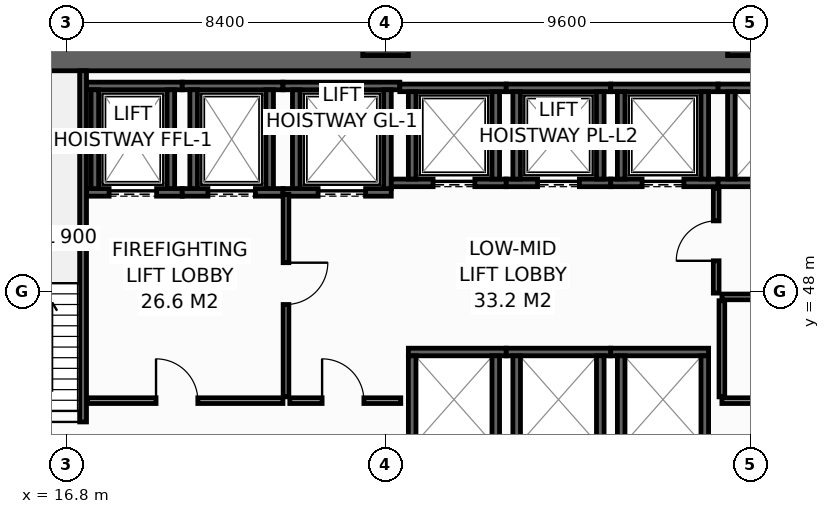
"""IFC4 building model, lengths in metres.
Left out: names, types, materials, properties, quantities, classifications, styles, units other than length and angle.
Written with IfcOpenShell. Run it as: python <this file> out.ifc"""

import sys

from ifc_helpers import new_model, si_unit, direction, frame, frame_2d, origin, origin_2d, place, context, subcontext, project, spatial, rectangle, hollow_rectangle, extrude, element, fill, save


model = new_model("IFC4")
c1 = context("Model", 3, precision=1e-05, world=origin(), true_north=direction((0.0, 1.0)))
c2 = subcontext(c1, "Body", "Model", "MODEL_VIEW")
j1 = project(units=[si_unit("LENGTHUNIT", "METRE"), si_unit("PLANEANGLEUNIT", "RADIAN")], contexts=[c1])
p1 = place(None, origin())
s1 = spatial("IfcSite", under=j1, at=p1, CompositionType="ELEMENT")
p2 = place(p1, origin())
s2 = spatial("IfcBuilding", under=s1, at=p2, CompositionType="ELEMENT")
p3 = place(p2, frame((0.0, 0.0, 92.8)))
s3 = spatial("IfcBuildingStorey", under=s2, at=p3, CompositionType="ELEMENT", Elevation=92.8)
p4 = place(p3, frame((13.5, 54.1, 0.0), z_axis=(0.0, 0.0, 1.0), x_axis=(1.0, 0.0, 0.0)))
e1 = element("IfcWall", 1, at=p4, inside=s3, PredefinedType="SHEAR", context=c2, shape_type="SweptSolid", body=[
    extrude(rectangle(XDim=32.9, YDim=0.6, at=frame_2d((16.45, 0.0))), origin(), (0.0, 0.0, 1.0), 4.15),
])
for number, where, z_axis, x_axis in (
    (2, (25.2, 54.8, 0.0), (0.0, 0.0, 1.0), (1.0, 0.0, 0.0)),
    (3, (34.8, 54.8, 0.0), (0.0, 0.0, 1.0), (1.0, 0.0, 0.0)),
):
    element("IfcColumn", number, at=place(p3, frame(where, z_axis=z_axis, x_axis=x_axis)), inside=s3, PredefinedType="COLUMN", context=c2, shape_type="SweptSolid", body=[
        extrude(hollow_rectangle(XDim=1.2, YDim=1.2, WallThickness=0.055, at=origin_2d()), origin(), (0.0, 0.0, 1.0), 4.4),
    ])
p5 = place(p3, frame((17.33, 50.6, 0.0), z_axis=(0.0, 0.0, 1.0), x_axis=(1.0, 0.0, 0.0)))
e4 = element("IfcWall", 4, at=p5, inside=s3, PredefinedType="SHEAR", context=c2, shape_type="SweptSolid", body=[
    extrude(rectangle(XDim=2.52, YDim=0.2, at=frame_2d((1.26, 0.0))), origin(), (0.0, 0.0, 1.0), 4.15),
])
p6 = place(p5, frame((0.595, 0.0, 0.0)))
e5 = element("IfcOpeningElement", 5, at=p6, cuts=e4, PredefinedType="OPENING", context=c2, shape_type="SweptSolid", body=[
    extrude(rectangle(XDim=1.25, YDim=2.3, at=frame_2d((0.625, 1.15))), frame((0.0, 0.11, 0.0), z_axis=(0.0, -1.0, 0.0), x_axis=(1.0, 0.0, 0.0)), (0.0, 0.0, 1.0), 0.22),
])
p7 = place(p3, frame((17.33, 53.4, 0.0), z_axis=(0.0, 0.0, 1.0), x_axis=(1.0, 0.0, 0.0)))
e6 = element("IfcWall", 6, at=p7, inside=s3, PredefinedType="SHEAR", context=c2, shape_type="SweptSolid", body=[
    extrude(rectangle(XDim=2.52, YDim=0.2, at=frame_2d((1.26, 0.0))), origin(), (0.0, 0.0, 1.0), 4.15),
])
for number, where, z_axis, x_axis in (
    (7, (17.55, 50.7, 0.0), (0.0, 0.0, 1.0), (0.0, 1.0, 0.0)),
    (8, (19.55, 50.7, 0.0), (0.0, 0.0, 1.0), (0.0, 1.0, 0.0)),
):
    element("IfcWall", number, at=place(p3, frame(where, z_axis=z_axis, x_axis=x_axis)), inside=s3, PredefinedType="SHEAR", context=c2, shape_type="SweptSolid", body=[
        extrude(rectangle(XDim=2.6, YDim=0.2, at=frame_2d((1.3, 0.0))), origin(), (0.0, 0.0, 1.0), 4.15),
    ])
p8 = place(p3, frame((19.85, 50.6, 0.0), z_axis=(0.0, 0.0, 1.0), x_axis=(1.0, 0.0, 0.0)))
e9 = element("IfcWall", 9, at=p8, inside=s3, PredefinedType="SHEAR", context=c2, shape_type="SweptSolid", body=[
    extrude(rectangle(XDim=2.65, YDim=0.2, at=frame_2d((1.325, 0.0))), origin(), (0.0, 0.0, 1.0), 4.15),
])
p9 = place(p8, frame((0.675, 0.0, 0.0)))
e10 = element("IfcOpeningElement", 10, at=p9, cuts=e9, PredefinedType="OPENING", context=c2, shape_type="SweptSolid", body=[
    extrude(rectangle(XDim=1.25, YDim=2.3, at=frame_2d((0.625, 1.15))), frame((0.0, 0.11, 0.0), z_axis=(0.0, -1.0, 0.0), x_axis=(1.0, 0.0, 0.0)), (0.0, 0.0, 1.0), 0.22),
])
p10 = place(p3, frame((19.85, 53.4, 0.0), z_axis=(0.0, 0.0, 1.0), x_axis=(1.0, 0.0, 0.0)))
e11 = element("IfcWall", 11, at=p10, inside=s3, PredefinedType="SHEAR", context=c2, shape_type="SweptSolid", body=[
    extrude(rectangle(XDim=2.65, YDim=0.2, at=frame_2d((1.325, 0.0))), origin(), (0.0, 0.0, 1.0), 4.15),
])
for number, where, z_axis, x_axis in (
    (12, (20.15, 50.7, 0.0), (0.0, 0.0, 1.0), (0.0, 1.0, 0.0)),
    (13, (22.15, 50.7, 0.0), (0.0, 0.0, 1.0), (0.0, 1.0, 0.0)),
):
    element("IfcWall", number, at=place(p3, frame(where, z_axis=z_axis, x_axis=x_axis)), inside=s3, PredefinedType="SHEAR", context=c2, shape_type="SweptSolid", body=[
        extrude(rectangle(XDim=2.6, YDim=0.2, at=frame_2d((1.3, 0.0))), origin(), (0.0, 0.0, 1.0), 4.15),
    ])
p11 = place(p3, frame((22.5, 50.6, 0.0), z_axis=(0.0, 0.0, 1.0), x_axis=(1.0, 0.0, 0.0)))
e14 = element("IfcWall", 14, at=p11, inside=s3, PredefinedType="SHEAR", context=c2, shape_type="SweptSolid", body=[
    extrude(rectangle(XDim=2.85, YDim=0.2, at=frame_2d((1.425, 0.0))), origin(), (0.0, 0.0, 1.0), 4.15),
])
p12 = place(p11, frame((0.925, 0.0, 0.0)))
e15 = element("IfcOpeningElement", 15, at=p12, cuts=e14, PredefinedType="OPENING", context=c2, shape_type="SweptSolid", body=[
    extrude(rectangle(XDim=1.25, YDim=2.3, at=frame_2d((0.625, 1.15))), frame((0.0, 0.11, 0.0), z_axis=(0.0, -1.0, 0.0), x_axis=(1.0, 0.0, 0.0)), (0.0, 0.0, 1.0), 0.22),
])
p13 = place(p3, frame((22.5, 53.4, 0.0), z_axis=(0.0, 0.0, 1.0), x_axis=(1.0, 0.0, 0.0)))
e16 = element("IfcWall", 16, at=p13, inside=s3, PredefinedType="SHEAR", context=c2, shape_type="SweptSolid", body=[
    extrude(rectangle(XDim=3.075, YDim=0.2, at=frame_2d((1.538, 0.0))), origin(), (0.0, 0.0, 1.0), 4.15),
])
for number, where, z_axis, x_axis in (
    (17, (22.85, 50.7, 0.0), (0.0, 0.0, 1.0), (0.0, 1.0, 0.0)),
    (18, (25.25, 50.7, 0.0), (0.0, 0.0, 1.0), (0.0, 1.0, 0.0)),
):
    element("IfcWall", number, at=place(p3, frame(where, z_axis=z_axis, x_axis=x_axis)), inside=s3, PredefinedType="SHEAR", context=c2, shape_type="SweptSolid", body=[
        extrude(rectangle(XDim=2.6, YDim=0.2, at=frame_2d((1.3, 0.0))), origin(), (0.0, 0.0, 1.0), 4.15),
    ])
p14 = place(p3, frame((25.35, 50.85, 0.0), z_axis=(0.0, 0.0, 1.0), x_axis=(1.0, 0.0, 0.0)))
e19 = element("IfcWall", 19, at=p14, inside=s3, PredefinedType="SHEAR", context=c2, shape_type="SweptSolid", body=[
    extrude(rectangle(XDim=3.025, YDim=0.2, at=frame_2d((1.512, 0.0))), origin(), (0.0, 0.0, 1.0), 4.15),
])
p15 = place(p14, frame((1.1, 0.0, 0.0)))
e20 = element("IfcOpeningElement", 20, at=p15, cuts=e19, PredefinedType="OPENING", context=c2, shape_type="SweptSolid", body=[
    extrude(rectangle(XDim=1.1, YDim=2.2, at=frame_2d((0.55, 1.1))), frame((0.0, 0.11, 0.0), z_axis=(0.0, -1.0, 0.0), x_axis=(1.0, 0.0, 0.0)), (0.0, 0.0, 1.0), 0.22),
])
p16 = place(p3, frame((25.575, 53.35, 0.0), z_axis=(0.0, 0.0, 1.0), x_axis=(1.0, 0.0, 0.0)))
e21 = element("IfcWall", 21, at=p16, inside=s3, PredefinedType="SHEAR", context=c2, shape_type="SweptSolid", body=[
    extrude(rectangle(XDim=2.8, YDim=0.2, at=frame_2d((1.4, 0.0))), origin(), (0.0, 0.0, 1.0), 4.15),
])
for number, where, z_axis, x_axis in (
    (22, (25.9, 50.95, 0.0), (0.0, 0.0, 1.0), (0.0, 1.0, 0.0)),
    (23, (28.1, 50.95, 0.0), (0.0, 0.0, 1.0), (0.0, 1.0, 0.0)),
):
    element("IfcWall", number, at=place(p3, frame(where, z_axis=z_axis, x_axis=x_axis)), inside=s3, PredefinedType="SHEAR", context=c2, shape_type="SweptSolid", body=[
        extrude(rectangle(XDim=2.3, YDim=0.2, at=frame_2d((1.15, 0.0))), origin(), (0.0, 0.0, 1.0), 4.15),
    ])
p17 = place(p3, frame((28.375, 50.85, 0.0), z_axis=(0.0, 0.0, 1.0), x_axis=(1.0, 0.0, 0.0)))
e24 = element("IfcWall", 24, at=p17, inside=s3, PredefinedType="SHEAR", context=c2, shape_type="SweptSolid", body=[
    extrude(rectangle(XDim=2.75, YDim=0.2, at=frame_2d((1.375, 0.0))), origin(), (0.0, 0.0, 1.0), 4.15),
])
p18 = place(p17, frame((0.825, 0.0, 0.0)))
e25 = element("IfcOpeningElement", 25, at=p18, cuts=e24, PredefinedType="OPENING", context=c2, shape_type="SweptSolid", body=[
    extrude(rectangle(XDim=1.1, YDim=2.2, at=frame_2d((0.55, 1.1))), frame((0.0, 0.11, 0.0), z_axis=(0.0, -1.0, 0.0), x_axis=(1.0, 0.0, 0.0)), (0.0, 0.0, 1.0), 0.22),
])
p19 = place(p3, frame((28.375, 53.35, 0.0), z_axis=(0.0, 0.0, 1.0), x_axis=(1.0, 0.0, 0.0)))
e26 = element("IfcWall", 26, at=p19, inside=s3, PredefinedType="SHEAR", context=c2, shape_type="SweptSolid", body=[
    extrude(rectangle(XDim=2.75, YDim=0.2, at=frame_2d((1.375, 0.0))), origin(), (0.0, 0.0, 1.0), 4.15),
])
for number, where, z_axis, x_axis in (
    (27, (28.65, 50.95, 0.0), (0.0, 0.0, 1.0), (0.0, 1.0, 0.0)),
    (28, (30.85, 50.95, 0.0), (0.0, 0.0, 1.0), (0.0, 1.0, 0.0)),
):
    element("IfcWall", number, at=place(p3, frame(where, z_axis=z_axis, x_axis=x_axis)), inside=s3, PredefinedType="SHEAR", context=c2, shape_type="SweptSolid", body=[
        extrude(rectangle(XDim=2.3, YDim=0.2, at=frame_2d((1.15, 0.0))), origin(), (0.0, 0.0, 1.0), 4.15),
    ])
p20 = place(p3, frame((31.125, 50.85, 0.0), z_axis=(0.0, 0.0, 1.0), x_axis=(1.0, 0.0, 0.0)))
e29 = element("IfcWall", 29, at=p20, inside=s3, PredefinedType="SHEAR", context=c2, shape_type="SweptSolid", body=[
    extrude(rectangle(XDim=2.825, YDim=0.2, at=frame_2d((1.413, 0.0))), origin(), (0.0, 0.0, 1.0), 4.15),
])
p21 = place(p20, frame((0.825, 0.0, 0.0)))
e30 = element("IfcOpeningElement", 30, at=p21, cuts=e29, PredefinedType="OPENING", context=c2, shape_type="SweptSolid", body=[
    extrude(rectangle(XDim=1.1, YDim=2.2, at=frame_2d((0.55, 1.1))), frame((0.0, 0.11, 0.0), z_axis=(0.0, -1.0, 0.0), x_axis=(1.0, 0.0, 0.0)), (0.0, 0.0, 1.0), 0.22),
])
p22 = place(p3, frame((31.125, 53.35, 0.0), z_axis=(0.0, 0.0, 1.0), x_axis=(1.0, 0.0, 0.0)))
e31 = element("IfcWall", 31, at=p22, inside=s3, PredefinedType="SHEAR", context=c2, shape_type="SweptSolid", body=[
    extrude(rectangle(XDim=2.825, YDim=0.2, at=frame_2d((1.413, 0.0))), origin(), (0.0, 0.0, 1.0), 4.15),
])
for number, where, z_axis, x_axis in (
    (32, (31.4, 50.95, 0.0), (0.0, 0.0, 1.0), (0.0, 1.0, 0.0)),
    (33, (33.6, 50.95, 0.0), (0.0, 0.0, 1.0), (0.0, 1.0, 0.0)),
):
    element("IfcWall", number, at=place(p3, frame(where, z_axis=z_axis, x_axis=x_axis)), inside=s3, PredefinedType="SHEAR", context=c2, shape_type="SweptSolid", body=[
        extrude(rectangle(XDim=2.3, YDim=0.2, at=frame_2d((1.15, 0.0))), origin(), (0.0, 0.0, 1.0), 4.15),
    ])
p23 = place(p3, frame((25.8, 46.4, 0.0), z_axis=(0.0, 0.0, 1.0), x_axis=(1.0, 0.0, 0.0)))
e34 = element("IfcWall", 34, at=p23, inside=s3, PredefinedType="SHEAR", context=c2, shape_type="SweptSolid", body=[
    extrude(rectangle(XDim=2.575, YDim=0.2, at=frame_2d((1.288, 0.0))), origin(), (0.0, 0.0, 1.0), 4.15),
])
for number, where, z_axis, x_axis in (
    (35, (25.9, 44.0, 0.0), (0.0, 0.0, 1.0), (0.0, 1.0, 0.0)),
    (36, (28.1, 44.0, 0.0), (0.0, 0.0, 1.0), (0.0, 1.0, 0.0)),
):
    element("IfcWall", number, at=place(p3, frame(where, z_axis=z_axis, x_axis=x_axis)), inside=s3, PredefinedType="SHEAR", context=c2, shape_type="SweptSolid", body=[
        extrude(rectangle(XDim=2.3, YDim=0.2, at=frame_2d((1.15, 0.0))), origin(), (0.0, 0.0, 1.0), 4.15),
    ])
p24 = place(p3, frame((28.375, 46.4, 0.0), z_axis=(0.0, 0.0, 1.0), x_axis=(1.0, 0.0, 0.0)))
e37 = element("IfcWall", 37, at=p24, inside=s3, PredefinedType="SHEAR", context=c2, shape_type="SweptSolid", body=[
    extrude(rectangle(XDim=2.75, YDim=0.2, at=frame_2d((1.375, 0.0))), origin(), (0.0, 0.0, 1.0), 4.15),
])
for number, where, z_axis, x_axis in (
    (38, (28.65, 44.0, 0.0), (0.0, 0.0, 1.0), (0.0, 1.0, 0.0)),
    (39, (30.85, 44.0, 0.0), (0.0, 0.0, 1.0), (0.0, 1.0, 0.0)),
):
    element("IfcWall", number, at=place(p3, frame(where, z_axis=z_axis, x_axis=x_axis)), inside=s3, PredefinedType="SHEAR", context=c2, shape_type="SweptSolid", body=[
        extrude(rectangle(XDim=2.3, YDim=0.2, at=frame_2d((1.15, 0.0))), origin(), (0.0, 0.0, 1.0), 4.15),
    ])
p25 = place(p3, frame((31.125, 46.4, 0.0), z_axis=(0.0, 0.0, 1.0), x_axis=(1.0, 0.0, 0.0)))
e40 = element("IfcWall", 40, at=p25, inside=s3, PredefinedType="SHEAR", context=c2, shape_type="SweptSolid", body=[
    extrude(rectangle(XDim=2.575, YDim=0.2, at=frame_2d((1.288, 0.0))), origin(), (0.0, 0.0, 1.0), 4.15),
])
for number, where, z_axis, x_axis in (
    (41, (31.4, 44.0, 0.0), (0.0, 0.0, 1.0), (0.0, 1.0, 0.0)),
    (42, (33.6, 44.0, 0.0), (0.0, 0.0, 1.0), (0.0, 1.0, 0.0)),
):
    element("IfcWall", number, at=place(p3, frame(where, z_axis=z_axis, x_axis=x_axis)), inside=s3, PredefinedType="SHEAR", context=c2, shape_type="SweptSolid", body=[
        extrude(rectangle(XDim=2.3, YDim=0.2, at=frame_2d((1.15, 0.0))), origin(), (0.0, 0.0, 1.0), 4.15),
    ])
for number, where, z_axis, x_axis in (
    (43, (33.95, 50.85, 0.0), (0.0, 0.0, 1.0), (1.0, 0.0, 0.0)),
    (44, (33.95, 53.35, 0.0), (0.0, 0.0, 1.0), (1.0, 0.0, 0.0)),
):
    element("IfcWall", number, at=place(p3, frame(where, z_axis=z_axis, x_axis=x_axis)), inside=s3, PredefinedType="SHEAR", context=c2, shape_type="SweptSolid", body=[
        extrude(rectangle(XDim=2.825, YDim=0.2, at=frame_2d((1.413, 0.0))), origin(), (0.0, 0.0, 1.0), 4.15),
    ])
p26 = place(p3, frame((34.3, 50.95, 0.0), z_axis=(0.0, 0.0, 1.0), x_axis=(0.0, 1.0, 0.0)))
e45 = element("IfcWall", 45, at=p26, inside=s3, PredefinedType="SHEAR", context=c2, shape_type="SweptSolid", body=[
    extrude(rectangle(XDim=2.3, YDim=0.2, at=frame_2d((1.15, 0.0))), origin(), (0.0, 0.0, 1.0), 4.15),
])
p27 = place(p3, frame((17.24, 43.4, 0.0), z_axis=(0.0, 0.0, 1.0), x_axis=(0.0, 1.0, 0.0)))
e46 = element("IfcWall", 46, at=p27, inside=s3, PredefinedType="SHEAR", context=c2, shape_type="SweptSolid", body=[
    extrude(rectangle(XDim=10.4, YDim=0.18, at=frame_2d((5.2, 0.0))), origin(), (0.0, 0.0, 1.0), 4.15),
])
p28 = place(p27, frame((0.16, 0.0, 0.0)))
e47 = element("IfcOpeningElement", 47, at=p28, cuts=e46, PredefinedType="OPENING", context=c2, shape_type="SweptSolid", body=[
    extrude(rectangle(XDim=1.0, YDim=2.15, at=frame_2d((0.5, 1.075))), frame((0.0, 0.1, 0.0), z_axis=(0.0, -1.0, 0.0), x_axis=(1.0, 0.0, 0.0)), (0.0, 0.0, 1.0), 0.2),
])
p29 = place(p3, frame((17.36, 45.12, 0.0), z_axis=(0.0, 0.0, 1.0), x_axis=(1.0, 0.0, 0.0)))
e48 = element("IfcWall", 48, at=p29, inside=s3, PredefinedType="PARTITIONING", context=c2, shape_type="SweptSolid", body=[
    extrude(rectangle(XDim=5.14, YDim=0.15, at=frame_2d((2.57, 0.0))), origin(), (0.0, 0.0, 1.0), 4.15),
])
p30 = place(p29, frame((1.8, 0.0, 0.0)))
e49 = element("IfcOpeningElement", 49, at=p30, cuts=e48, PredefinedType="OPENING", context=c2, shape_type="SweptSolid", body=[
    extrude(rectangle(XDim=1.1, YDim=2.15, at=frame_2d((0.55, 1.075))), frame((0.0, 0.085, 0.0), z_axis=(0.0, -1.0, 0.0), x_axis=(1.0, 0.0, 0.0)), (0.0, 0.0, 1.0), 0.17),
])
p31 = place(p3, frame((22.58, 50.55, 0.0), z_axis=(0.0, 0.0, 1.0), x_axis=(0.0, -1.0, 0.0)))
e50 = element("IfcWall", 50, at=p31, inside=s3, PredefinedType="PARTITIONING", context=c2, shape_type="SweptSolid", body=[
    extrude(rectangle(XDim=5.33, YDim=0.15, at=frame_2d((2.665, 0.0))), origin(), (0.0, 0.0, 1.0), 4.15),
])
p32 = place(p31, frame((1.8, 0.0, 0.0)))
e51 = element("IfcOpeningElement", 51, at=p32, cuts=e50, PredefinedType="OPENING", context=c2, shape_type="SweptSolid", body=[
    extrude(rectangle(XDim=1.1, YDim=2.15, at=frame_2d((0.55, 1.075))), frame((0.0, 0.085, 0.0), z_axis=(0.0, -1.0, 0.0), x_axis=(1.0, 0.0, 0.0)), (0.0, 0.0, 1.0), 0.17),
])
p33 = place(p3, frame((22.68, 45.12, 0.0), z_axis=(0.0, 0.0, 1.0), x_axis=(1.0, 0.0, 0.0)))
e52 = element("IfcWall", 52, at=p33, inside=s3, PredefinedType="PARTITIONING", context=c2, shape_type="SweptSolid", body=[
    extrude(rectangle(XDim=2.92, YDim=0.15, at=frame_2d((1.46, 0.0))), origin(), (0.0, 0.0, 1.0), 4.15),
])
p34 = place(p33, frame((0.85, 0.0, 0.0)))
e53 = element("IfcOpeningElement", 53, at=p34, cuts=e52, PredefinedType="OPENING", context=c2, shape_type="SweptSolid", body=[
    extrude(rectangle(XDim=1.1, YDim=2.15, at=frame_2d((0.55, 1.075))), frame((0.0, 0.085, 0.0), z_axis=(0.0, -1.0, 0.0), x_axis=(1.0, 0.0, 0.0)), (0.0, 0.0, 1.0), 0.17),
])
p35 = place(p3, frame((33.9, 47.95, 0.0), z_axis=(0.0, 0.0, 1.0), x_axis=(0.0, 1.0, 0.0)))
e54 = element("IfcWall", 54, at=p35, inside=s3, PredefinedType="PARTITIONING", context=c2, shape_type="SweptSolid", body=[
    extrude(rectangle(XDim=2.75, YDim=0.15, at=frame_2d((1.375, 0.0))), origin(), (0.0, 0.0, 1.0), 4.15),
])
p36 = place(p35, frame((0.85, 0.0, 0.0)))
e55 = element("IfcOpeningElement", 55, at=p36, cuts=e54, PredefinedType="OPENING", context=c2, shape_type="SweptSolid", body=[
    extrude(rectangle(XDim=1.05, YDim=2.15, at=frame_2d((0.525, 1.075))), frame((0.0, 0.085, 0.0), z_axis=(0.0, -1.0, 0.0), x_axis=(1.0, 0.0, 0.0)), (0.0, 0.0, 1.0), 0.17),
])
p37 = place(p3, frame((34.05, 45.12, 0.0), z_axis=(0.0, 0.0, 1.0), x_axis=(1.0, 0.0, 0.0)))
e56 = element("IfcWall", 56, at=p37, inside=s3, PredefinedType="PARTITIONING", context=c2, shape_type="SweptSolid", body=[
    extrude(rectangle(XDim=8.45, YDim=0.15, at=frame_2d((4.225, 0.0))), origin(), (0.0, 0.0, 1.0), 4.15),
])
p38 = place(p37, frame((1.5, 0.0, 0.0)))
e57 = element("IfcOpeningElement", 57, at=p38, cuts=e56, PredefinedType="OPENING", context=c2, shape_type="SweptSolid", body=[
    extrude(rectangle(XDim=0.95, YDim=2.15, at=frame_2d((0.475, 1.075))), frame((0.0, 0.085, 0.0), z_axis=(0.0, -1.0, 0.0), x_axis=(1.0, 0.0, 0.0)), (0.0, 0.0, 1.0), 0.17),
])
p39 = place(p37, frame((5.8, 0.0, 0.0)))
e58 = element("IfcOpeningElement", 58, at=p39, cuts=e56, PredefinedType="OPENING", context=c2, shape_type="SweptSolid", body=[
    extrude(rectangle(XDim=0.95, YDim=2.15, at=frame_2d((0.475, 1.075))), frame((0.0, 0.085, 0.0), z_axis=(0.0, -1.0, 0.0), x_axis=(1.0, 0.0, 0.0)), (0.0, 0.0, 1.0), 0.17),
])
p40 = place(p3, frame((34.05, 47.85, 0.0), z_axis=(0.0, 0.0, 1.0), x_axis=(1.0, 0.0, 0.0)))
e59 = element("IfcWall", 59, at=p40, inside=s3, PredefinedType="PARTITIONING", context=c2, shape_type="SweptSolid", body=[
    extrude(rectangle(XDim=8.45, YDim=0.15, at=frame_2d((4.225, 0.0))), origin(), (0.0, 0.0, 1.0), 4.15),
])
p41 = place(p3, frame((34.05, 45.22, 0.0), z_axis=(0.0, 0.0, 1.0), x_axis=(0.0, 1.0, 0.0)))
e60 = element("IfcWall", 60, at=p41, inside=s3, PredefinedType="PARTITIONING", context=c2, shape_type="SweptSolid", body=[
    extrude(rectangle(XDim=2.53, YDim=0.15, at=frame_2d((1.265, 0.0))), origin(), (0.0, 0.0, 1.0), 4.15),
])
p42 = place(p6, origin())
e61 = element("IfcDoor", 61, at=p42, inside=s3, OperationType="SLIDING_TO_LEFT", PredefinedType="DOOR", context=c2, shape_type="SweptSolid", body=[
    extrude(rectangle(XDim=1.25, YDim=2.3, at=frame_2d((0.625, 1.15))), frame((0.0, 0.025, 0.0), z_axis=(0.0, -1.0, 0.0), x_axis=(1.0, 0.0, 0.0)), (0.0, 0.0, 1.0), 0.05),
])
fill(e5, e61)
p43 = place(p9, origin())
e62 = element("IfcDoor", 62, at=p43, inside=s3, OperationType="SLIDING_TO_LEFT", PredefinedType="DOOR", context=c2, shape_type="SweptSolid", body=[
    extrude(rectangle(XDim=1.25, YDim=2.3, at=frame_2d((0.625, 1.15))), frame((0.0, 0.025, 0.0), z_axis=(0.0, -1.0, 0.0), x_axis=(1.0, 0.0, 0.0)), (0.0, 0.0, 1.0), 0.05),
])
fill(e10, e62)
p44 = place(p12, origin())
e63 = element("IfcDoor", 63, at=p44, inside=s3, OperationType="SLIDING_TO_LEFT", PredefinedType="DOOR", context=c2, shape_type="SweptSolid", body=[
    extrude(rectangle(XDim=1.25, YDim=2.3, at=frame_2d((0.625, 1.15))), frame((0.0, 0.025, 0.0), z_axis=(0.0, -1.0, 0.0), x_axis=(1.0, 0.0, 0.0)), (0.0, 0.0, 1.0), 0.05),
])
fill(e15, e63)
p45 = place(p15, origin())
e64 = element("IfcDoor", 64, at=p45, inside=s3, OperationType="SLIDING_TO_LEFT", PredefinedType="DOOR", context=c2, shape_type="SweptSolid", body=[
    extrude(rectangle(XDim=1.1, YDim=2.2, at=frame_2d((0.55, 1.1))), frame((0.0, 0.025, 0.0), z_axis=(0.0, -1.0, 0.0), x_axis=(1.0, 0.0, 0.0)), (0.0, 0.0, 1.0), 0.05),
])
fill(e20, e64)
p46 = place(p18, origin())
e65 = element("IfcDoor", 65, at=p46, inside=s3, OperationType="SLIDING_TO_LEFT", PredefinedType="DOOR", context=c2, shape_type="SweptSolid", body=[
    extrude(rectangle(XDim=1.1, YDim=2.2, at=frame_2d((0.55, 1.1))), frame((0.0, 0.025, 0.0), z_axis=(0.0, -1.0, 0.0), x_axis=(1.0, 0.0, 0.0)), (0.0, 0.0, 1.0), 0.05),
])
fill(e25, e65)
p47 = place(p21, origin())
e66 = element("IfcDoor", 66, at=p47, inside=s3, OperationType="SLIDING_TO_LEFT", PredefinedType="DOOR", context=c2, shape_type="SweptSolid", body=[
    extrude(rectangle(XDim=1.1, YDim=2.2, at=frame_2d((0.55, 1.1))), frame((0.0, 0.025, 0.0), z_axis=(0.0, -1.0, 0.0), x_axis=(1.0, 0.0, 0.0)), (0.0, 0.0, 1.0), 0.05),
])
fill(e30, e66)
p48 = place(p28, origin())
e67 = element("IfcDoor", 67, at=p48, inside=s3, OperationType="SINGLE_SWING_RIGHT", PredefinedType="DOOR", context=c2, shape_type="SweptSolid", body=[
    extrude(rectangle(XDim=1.0, YDim=2.15, at=frame_2d((0.5, 1.075))), frame((0.0, 0.025, 0.0), z_axis=(0.0, -1.0, 0.0), x_axis=(1.0, 0.0, 0.0)), (0.0, 0.0, 1.0), 0.05),
])
fill(e47, e67)
p49 = place(p30, origin())
e68 = element("IfcDoor", 68, at=p49, inside=s3, OperationType="SINGLE_SWING_LEFT", PredefinedType="DOOR", context=c2, shape_type="SweptSolid", body=[
    extrude(rectangle(XDim=1.1, YDim=2.15, at=frame_2d((0.55, 1.075))), frame((0.0, 0.025, 0.0), z_axis=(0.0, -1.0, 0.0), x_axis=(1.0, 0.0, 0.0)), (0.0, 0.0, 1.0), 0.05),
])
fill(e49, e68)
p50 = place(p32, origin())
e69 = element("IfcDoor", 69, at=p50, inside=s3, OperationType="SINGLE_SWING_LEFT", PredefinedType="DOOR", context=c2, shape_type="SweptSolid", body=[
    extrude(rectangle(XDim=1.1, YDim=2.15, at=frame_2d((0.55, 1.075))), frame((0.0, 0.025, 0.0), z_axis=(0.0, -1.0, 0.0), x_axis=(1.0, 0.0, 0.0)), (0.0, 0.0, 1.0), 0.05),
])
fill(e51, e69)
p51 = place(p34, origin())
e70 = element("IfcDoor", 70, at=p51, inside=s3, OperationType="SINGLE_SWING_LEFT", PredefinedType="DOOR", context=c2, shape_type="SweptSolid", body=[
    extrude(rectangle(XDim=1.1, YDim=2.15, at=frame_2d((0.55, 1.075))), frame((0.0, 0.025, 0.0), z_axis=(0.0, -1.0, 0.0), x_axis=(1.0, 0.0, 0.0)), (0.0, 0.0, 1.0), 0.05),
])
fill(e53, e70)
p52 = place(p36, origin())
e71 = element("IfcDoor", 71, at=p52, inside=s3, OperationType="SINGLE_SWING_LEFT", PredefinedType="DOOR", context=c2, shape_type="SweptSolid", body=[
    extrude(rectangle(XDim=1.05, YDim=2.15, at=frame_2d((0.525, 1.075))), frame((0.0, 0.025, 0.0), z_axis=(0.0, -1.0, 0.0), x_axis=(1.0, 0.0, 0.0)), (0.0, 0.0, 1.0), 0.05),
])
fill(e55, e71)
save(model, sys.argv[1])
